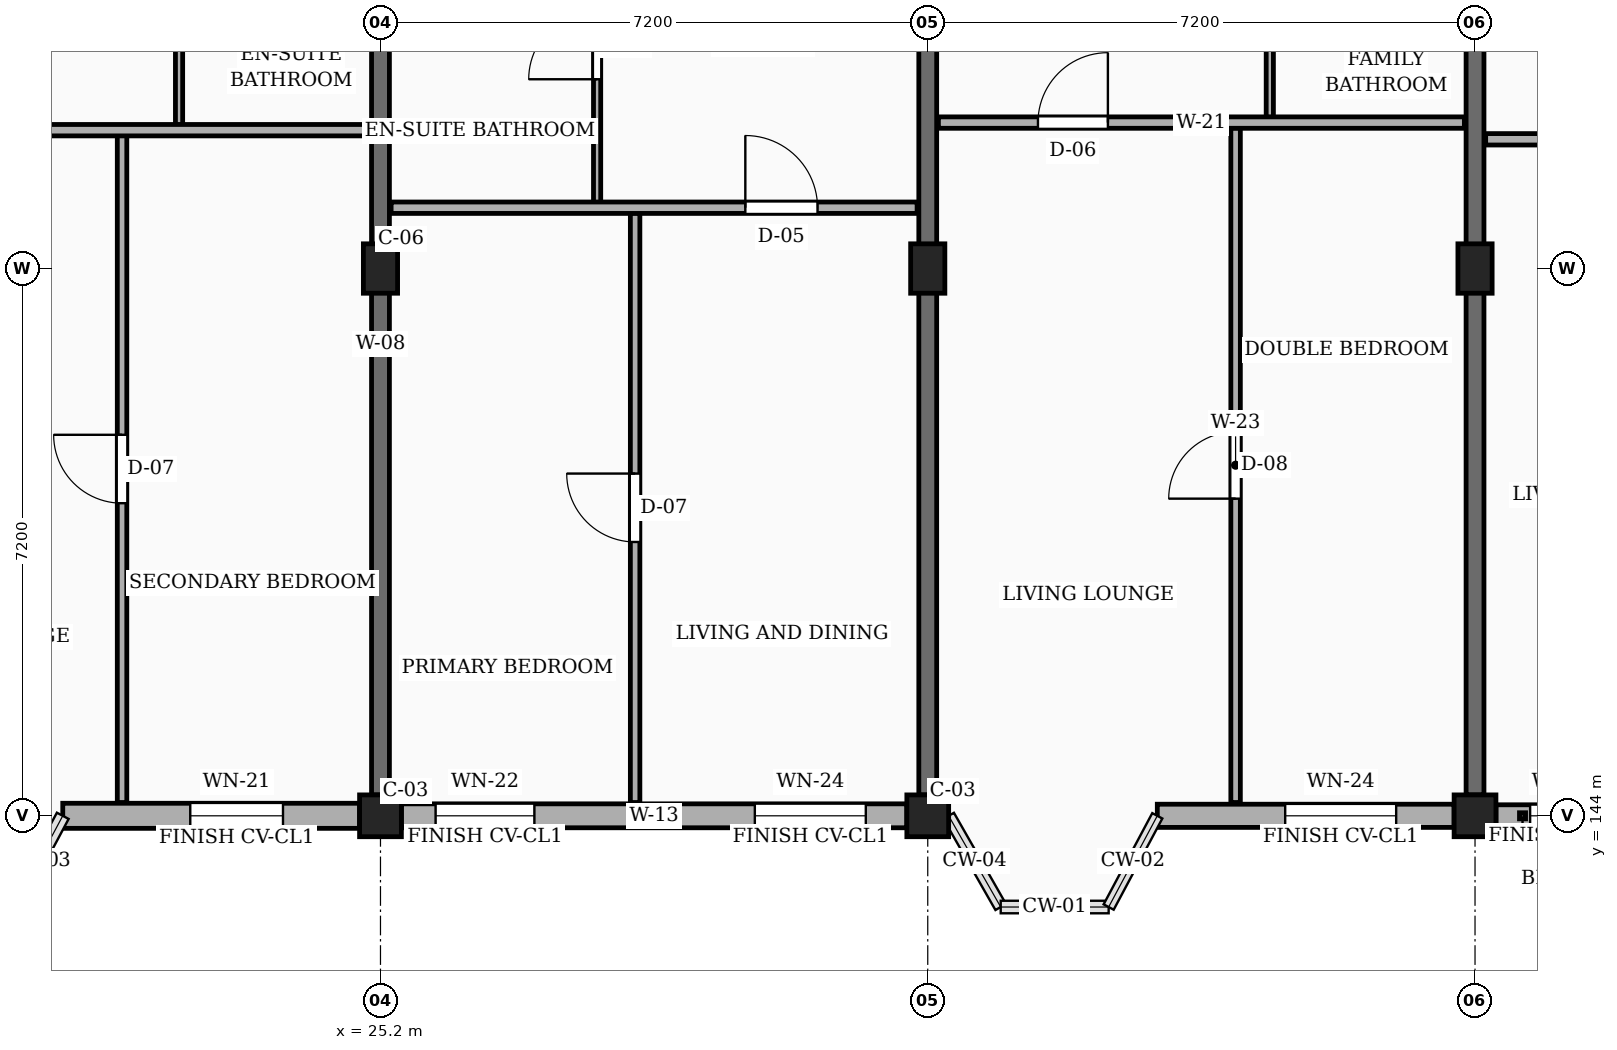
"""IFC4 building model, lengths in metres.
Left out: names, types, materials, properties, quantities, classifications, styles, units other than length and angle.
Written with IfcOpenShell. Run it as: python <this file> out.ifc"""

import sys

from ifc_helpers import new_model, si_unit, direction, frame, frame_2d, origin, origin_2d, place, context, subcontext, project, spatial, rectangle, extrude, element, fill, save


model = new_model("IFC4")
c1 = context("Model", 3, precision=1e-05, world=origin(), true_north=direction((0.0, 1.0)))
c2 = subcontext(c1, "Body", "Model", "MODEL_VIEW")
j1 = project(units=[si_unit("LENGTHUNIT", "METRE"), si_unit("PLANEANGLEUNIT", "RADIAN")], contexts=[c1])
p1 = place(None, origin())
s1 = spatial("IfcSite", under=j1, at=p1, CompositionType="ELEMENT")
p2 = place(p1, origin())
s2 = spatial("IfcBuilding", under=s1, at=p2, CompositionType="ELEMENT")
p3 = place(p2, frame((0.0, 0.0, 20.25)))
s3 = spatial("IfcBuildingStorey", under=s2, at=p3, CompositionType="ELEMENT", Elevation=20.25)
p4 = place(p3, frame((25.2, 144.0, 0.0), z_axis=(0.0, 0.0, 1.0), x_axis=(1.0, 0.0, 0.0)))
e1 = element("IfcColumn", 1, at=p4, inside=s3, PredefinedType="COLUMN", context=c2, shape_type="SweptSolid", body=[
    extrude(rectangle(XDim=0.55, YDim=0.55, at=origin_2d()), origin(), (0.0, 0.0, 1.0), 3.15),
])
p5 = place(p3, frame((25.2, 151.2, 0.0), z_axis=(0.0, 0.0, 1.0), x_axis=(1.0, 0.0, 0.0)))
e2 = element("IfcColumn", 2, at=p5, inside=s3, PredefinedType="COLUMN", context=c2, shape_type="SweptSolid", body=[
    extrude(rectangle(XDim=0.45, YDim=0.65, at=origin_2d()), origin(), (0.0, 0.0, 1.0), 3.15),
])
p6 = place(p3, frame((32.4, 144.0, 0.0), z_axis=(0.0, 0.0, 1.0), x_axis=(1.0, 0.0, 0.0)))
e3 = element("IfcColumn", 3, at=p6, inside=s3, PredefinedType="COLUMN", context=c2, shape_type="SweptSolid", body=[
    extrude(rectangle(XDim=0.55, YDim=0.55, at=origin_2d()), origin(), (0.0, 0.0, 1.0), 3.15),
])
p7 = place(p3, frame((32.4, 151.2, 0.0), z_axis=(0.0, 0.0, 1.0), x_axis=(1.0, 0.0, 0.0)))
e4 = element("IfcColumn", 4, at=p7, inside=s3, PredefinedType="COLUMN", context=c2, shape_type="SweptSolid", body=[
    extrude(rectangle(XDim=0.45, YDim=0.65, at=origin_2d()), origin(), (0.0, 0.0, 1.0), 3.15),
])
p8 = place(p3, frame((39.6, 144.0, 0.0), z_axis=(0.0, 0.0, 1.0), x_axis=(1.0, 0.0, 0.0)))
e5 = element("IfcColumn", 5, at=p8, inside=s3, PredefinedType="COLUMN", context=c2, shape_type="SweptSolid", body=[
    extrude(rectangle(XDim=0.55, YDim=0.55, at=origin_2d()), origin(), (0.0, 0.0, 1.0), 3.15),
])
p9 = place(p3, frame((39.6, 151.2, 0.0), z_axis=(0.0, 0.0, 1.0), x_axis=(1.0, 0.0, 0.0)))
e6 = element("IfcColumn", 6, at=p9, inside=s3, PredefinedType="COLUMN", context=c2, shape_type="SweptSolid", body=[
    extrude(rectangle(XDim=0.45, YDim=0.65, at=origin_2d()), origin(), (0.0, 0.0, 1.0), 3.15),
])
for number, where, z_axis, x_axis in (
    (7, (25.2, 144.275, 0.0), (0.0, 0.0, 1.0), (0.0, 1.0, 0.0)),
    (8, (32.4, 144.275, 0.0), (0.0, 0.0, 1.0), (0.0, 1.0, 0.0)),
    (9, (39.6, 144.275, 0.0), (0.0, 0.0, 1.0), (0.0, 1.0, 0.0)),
):
    element("IfcWall", number, at=place(p3, frame(where, z_axis=z_axis, x_axis=x_axis)), inside=s3, PredefinedType="SOLIDWALL", context=c2, shape_type="SweptSolid", body=[
        extrude(rectangle(XDim=11.875, YDim=0.235, at=frame_2d((5.938, 0.0))), origin(), (0.0, 0.0, 1.0), 2.185),
    ])
p10 = place(p3, frame((21.02, 144.0, 0.0), z_axis=(0.0, 0.0, 1.0), x_axis=(1.0, 0.0, 0.0)))
e10 = element("IfcWall", 10, at=p10, inside=s3, PredefinedType="SOLIDWALL", context=c2, shape_type="SweptSolid", body=[
    extrude(rectangle(XDim=3.905, YDim=0.33, at=frame_2d((1.953, 0.0))), origin(), (0.0, 0.0, 1.0), 2.455),
])
p11 = place(p10, frame((1.677, 0.0, 0.78)))
e11 = element("IfcOpeningElement", 11, at=p11, cuts=e10, PredefinedType="OPENING", context=c2, shape_type="SweptSolid", body=[
    extrude(rectangle(XDim=1.22, YDim=1.36, at=frame_2d((0.61, 0.68))), frame((0.0, 0.175, 0.0), z_axis=(0.0, -1.0, 0.0), x_axis=(1.0, 0.0, 0.0)), (0.0, 0.0, 1.0), 0.35),
])
p12 = place(p3, frame((25.475, 144.0, 0.0), z_axis=(0.0, 0.0, 1.0), x_axis=(1.0, 0.0, 0.0)))
e12 = element("IfcWall", 12, at=p12, inside=s3, PredefinedType="SOLIDWALL", context=c2, shape_type="SweptSolid", body=[
    extrude(rectangle(XDim=6.65, YDim=0.315, at=frame_2d((3.325, 0.0))), origin(), (0.0, 0.0, 1.0), 2.455),
])
p13 = place(p12, frame((0.45, 0.0, 0.78)))
e13 = element("IfcOpeningElement", 13, at=p13, cuts=e12, PredefinedType="OPENING", context=c2, shape_type="SweptSolid", body=[
    extrude(rectangle(XDim=1.3, YDim=1.36, at=frame_2d((0.65, 0.68))), frame((0.0, 0.167, 0.0), z_axis=(0.0, -1.0, 0.0), x_axis=(1.0, 0.0, 0.0)), (0.0, 0.0, 1.0), 0.335),
])
p14 = place(p12, frame((4.65, 0.0, 0.78)))
e14 = element("IfcOpeningElement", 14, at=p14, cuts=e12, PredefinedType="OPENING", context=c2, shape_type="SweptSolid", body=[
    extrude(rectangle(XDim=1.46, YDim=1.36, at=frame_2d((0.73, 0.68))), frame((0.0, 0.167, 0.0), z_axis=(0.0, -1.0, 0.0), x_axis=(1.0, 0.0, 0.0)), (0.0, 0.0, 1.0), 0.335),
])
p15 = place(p3, frame((35.42, 144.0, 0.0), z_axis=(0.0, 0.0, 1.0), x_axis=(1.0, 0.0, 0.0)))
e15 = element("IfcWall", 15, at=p15, inside=s3, PredefinedType="SOLIDWALL", context=c2, shape_type="SweptSolid", body=[
    extrude(rectangle(XDim=3.905, YDim=0.305, at=frame_2d((1.953, 0.0))), origin(), (0.0, 0.0, 1.0), 2.455),
])
p16 = place(p15, frame((1.683, 0.0, 0.78)))
e16 = element("IfcOpeningElement", 16, at=p16, cuts=e15, PredefinedType="OPENING", context=c2, shape_type="SweptSolid", body=[
    extrude(rectangle(XDim=1.46, YDim=1.36, at=frame_2d((0.73, 0.68))), frame((0.0, 0.163, 0.0), z_axis=(0.0, -1.0, 0.0), x_axis=(1.0, 0.0, 0.0)), (0.0, 0.0, 1.0), 0.325),
])
p17 = place(p3, frame((39.875, 144.0, 0.0), z_axis=(0.0, 0.0, 1.0), x_axis=(1.0, 0.0, 0.0)))
e17 = element("IfcWall", 17, at=p17, inside=s3, PredefinedType="SOLIDWALL", context=c2, shape_type="SweptSolid", body=[
    extrude(rectangle(XDim=6.65, YDim=0.29, at=frame_2d((3.325, 0.0))), origin(), (0.0, 0.0, 1.0), 2.455),
])
p18 = place(p17, frame((0.45, 0.0, 0.78)))
e18 = element("IfcOpeningElement", 18, at=p18, cuts=e17, PredefinedType="OPENING", context=c2, shape_type="SweptSolid", body=[
    extrude(rectangle(XDim=0.94, YDim=1.44, at=frame_2d((0.47, 0.72))), frame((0.0, 0.155, 0.0), z_axis=(0.0, -1.0, 0.0), x_axis=(1.0, 0.0, 0.0)), (0.0, 0.0, 1.0), 0.31),
])
p19 = place(p17, frame((4.65, 0.0, 0.78)))
e19 = element("IfcOpeningElement", 19, at=p19, cuts=e17, PredefinedType="OPENING", context=c2, shape_type="SweptSolid", body=[
    extrude(rectangle(XDim=1.15, YDim=1.44, at=frame_2d((0.575, 0.72))), frame((0.0, 0.155, 0.0), z_axis=(0.0, -1.0, 0.0), x_axis=(1.0, 0.0, 0.0)), (0.0, 0.0, 1.0), 0.31),
])
p20 = place(p3, frame((21.8, 144.175, 0.0), z_axis=(0.0, 0.0, 1.0), x_axis=(0.0, 1.0, 0.0)))
e20 = element("IfcWall", 20, at=p20, inside=s3, PredefinedType="PARTITIONING", context=c2, shape_type="SweptSolid", body=[
    extrude(rectangle(XDim=8.775, YDim=0.125, at=frame_2d((4.387, 0.0))), origin(), (0.0, 0.0, 1.0), 2.32),
])
p21 = place(p20, frame((3.938, 0.0, 0.0)))
e21 = element("IfcOpeningElement", 21, at=p21, cuts=e20, PredefinedType="OPENING", context=c2, shape_type="SweptSolid", body=[
    extrude(rectangle(XDim=0.9, YDim=2.1, at=frame_2d((0.45, 1.05))), frame((0.0, 0.073, 0.0), z_axis=(0.0, -1.0, 0.0), x_axis=(1.0, 0.0, 0.0)), (0.0, 0.0, 1.0), 0.145),
])
p22 = place(p3, frame((22.55, 153.09, 0.0), z_axis=(0.0, 0.0, 1.0), x_axis=(0.0, 1.0, 0.0)))
e22 = element("IfcWall", 22, at=p22, inside=s3, PredefinedType="PARTITIONING", context=c2, shape_type="SweptSolid", body=[
    extrude(rectangle(XDim=3.12, YDim=0.095, at=frame_2d((1.56, 0.0))), origin(), (0.0, 0.0, 1.0), 2.32),
])
p23 = place(p22, frame((1.11, 0.0, 0.0)))
e23 = element("IfcOpeningElement", 23, at=p23, cuts=e22, PredefinedType="OPENING", context=c2, shape_type="SweptSolid", body=[
    extrude(rectangle(XDim=0.9, YDim=2.05, at=frame_2d((0.45, 1.025))), frame((0.0, 0.058, 0.0), z_axis=(0.0, -1.0, 0.0), x_axis=(1.0, 0.0, 0.0)), (0.0, 0.0, 1.0), 0.115),
])
p24 = place(p3, frame((18.14, 153.02, 0.0), z_axis=(0.0, 0.0, 1.0), x_axis=(1.0, 0.0, 0.0)))
e24 = element("IfcWall", 24, at=p24, inside=s3, PredefinedType="PARTITIONING", context=c2, shape_type="SweptSolid", body=[
    extrude(rectangle(XDim=6.92, YDim=0.15, at=frame_2d((3.46, 0.0))), origin(), (0.0, 0.0, 1.0), 2.32),
])
p25 = place(p24, frame((1.31, 0.0, 0.0)))
e25 = element("IfcOpeningElement", 25, at=p25, cuts=e24, PredefinedType="OPENING", context=c2, shape_type="SweptSolid", body=[
    extrude(rectangle(XDim=0.95, YDim=2.1, at=frame_2d((0.475, 1.05))), frame((0.0, 0.085, 0.0), z_axis=(0.0, -1.0, 0.0), x_axis=(1.0, 0.0, 0.0)), (0.0, 0.0, 1.0), 0.17),
])
p26 = place(p3, frame((28.55, 144.175, 0.0), z_axis=(0.0, 0.0, 1.0), x_axis=(0.0, 1.0, 0.0)))
e26 = element("IfcWall", 26, at=p26, inside=s3, PredefinedType="PARTITIONING", context=c2, shape_type="SweptSolid", body=[
    extrude(rectangle(XDim=7.755, YDim=0.125, at=frame_2d((3.877, 0.0))), origin(), (0.0, 0.0, 1.0), 2.32),
])
p27 = place(p26, frame((3.427, 0.0, 0.0)))
e27 = element("IfcOpeningElement", 27, at=p27, cuts=e26, PredefinedType="OPENING", context=c2, shape_type="SweptSolid", body=[
    extrude(rectangle(XDim=0.9, YDim=2.1, at=frame_2d((0.45, 1.05))), frame((0.0, 0.073, 0.0), z_axis=(0.0, -1.0, 0.0), x_axis=(1.0, 0.0, 0.0)), (0.0, 0.0, 1.0), 0.145),
])
p28 = place(p3, frame((28.05, 152.07, 0.0), z_axis=(0.0, 0.0, 1.0), x_axis=(0.0, 1.0, 0.0)))
e28 = element("IfcWall", 28, at=p28, inside=s3, PredefinedType="PARTITIONING", context=c2, shape_type="SweptSolid", body=[
    extrude(rectangle(XDim=4.14, YDim=0.095, at=frame_2d((2.07, 0.0))), origin(), (0.0, 0.0, 1.0), 2.32),
])
p29 = place(p28, frame((1.62, 0.0, 0.0)))
e29 = element("IfcOpeningElement", 29, at=p29, cuts=e28, PredefinedType="OPENING", context=c2, shape_type="SweptSolid", body=[
    extrude(rectangle(XDim=0.9, YDim=2.05, at=frame_2d((0.45, 1.025))), frame((0.0, 0.058, 0.0), z_axis=(0.0, -1.0, 0.0), x_axis=(1.0, 0.0, 0.0)), (0.0, 0.0, 1.0), 0.115),
])
p30 = place(p3, frame((25.34, 152.0, 0.0), z_axis=(0.0, 0.0, 1.0), x_axis=(1.0, 0.0, 0.0)))
e30 = element("IfcWall", 30, at=p30, inside=s3, PredefinedType="PARTITIONING", context=c2, shape_type="SweptSolid", body=[
    extrude(rectangle(XDim=6.92, YDim=0.15, at=frame_2d((3.46, 0.0))), origin(), (0.0, 0.0, 1.0), 2.32),
])
p31 = place(p30, frame((4.66, 0.0, 0.0)))
e31 = element("IfcOpeningElement", 31, at=p31, cuts=e30, PredefinedType="OPENING", context=c2, shape_type="SweptSolid", body=[
    extrude(rectangle(XDim=0.95, YDim=2.1, at=frame_2d((0.475, 1.05))), frame((0.0, 0.085, 0.0), z_axis=(0.0, -1.0, 0.0), x_axis=(1.0, 0.0, 0.0)), (0.0, 0.0, 1.0), 0.17),
])
p32 = place(p3, frame((36.45, 144.175, 0.0), z_axis=(0.0, 0.0, 1.0), x_axis=(0.0, 1.0, 0.0)))
e32 = element("IfcWall", 32, at=p32, inside=s3, PredefinedType="PARTITIONING", context=c2, shape_type="SweptSolid", body=[
    extrude(rectangle(XDim=8.875, YDim=0.125, at=frame_2d((4.438, 0.0))), origin(), (0.0, 0.0, 1.0), 2.32),
])
p33 = place(p32, frame((3.998, 0.0, 0.0)))
e33 = element("IfcOpeningElement", 33, at=p33, cuts=e32, PredefinedType="OPENING", context=c2, shape_type="SweptSolid", body=[
    extrude(rectangle(XDim=0.88, YDim=2.08, at=frame_2d((0.44, 1.04))), frame((0.0, 0.073, 0.0), z_axis=(0.0, -1.0, 0.0), x_axis=(1.0, 0.0, 0.0)), (0.0, 0.0, 1.0), 0.145),
])
p34 = place(p3, frame((36.9, 153.19, 0.0), z_axis=(0.0, 0.0, 1.0), x_axis=(0.0, 1.0, 0.0)))
e34 = element("IfcWall", 34, at=p34, inside=s3, PredefinedType="PARTITIONING", context=c2, shape_type="SweptSolid", body=[
    extrude(rectangle(XDim=3.02, YDim=0.095, at=frame_2d((1.51, 0.0))), origin(), (0.0, 0.0, 1.0), 2.32),
])
p35 = place(p34, frame((1.075, 0.0, 0.0)))
e35 = element("IfcOpeningElement", 35, at=p35, cuts=e34, PredefinedType="OPENING", context=c2, shape_type="SweptSolid", body=[
    extrude(rectangle(XDim=0.87, YDim=2.05, at=frame_2d((0.435, 1.025))), frame((0.0, 0.058, 0.0), z_axis=(0.0, -1.0, 0.0), x_axis=(1.0, 0.0, 0.0)), (0.0, 0.0, 1.0), 0.115),
])
p36 = place(p3, frame((32.54, 153.12, 0.0), z_axis=(0.0, 0.0, 1.0), x_axis=(1.0, 0.0, 0.0)))
e36 = element("IfcWall", 36, at=p36, inside=s3, PredefinedType="PARTITIONING", context=c2, shape_type="SweptSolid", body=[
    extrude(rectangle(XDim=6.92, YDim=0.15, at=frame_2d((3.46, 0.0))), origin(), (0.0, 0.0, 1.0), 2.32),
])
p37 = place(p36, frame((1.31, 0.0, 0.0)))
e37 = element("IfcOpeningElement", 37, at=p37, cuts=e36, PredefinedType="OPENING", context=c2, shape_type="SweptSolid", body=[
    extrude(rectangle(XDim=0.92, YDim=2.1, at=frame_2d((0.46, 1.05))), frame((0.0, 0.085, 0.0), z_axis=(0.0, -1.0, 0.0), x_axis=(1.0, 0.0, 0.0)), (0.0, 0.0, 1.0), 0.17),
])
p38 = place(p3, frame((39.74, 152.9, 0.0), z_axis=(0.0, 0.0, 1.0), x_axis=(1.0, 0.0, 0.0)))
e38 = element("IfcWall", 38, at=p38, inside=s3, PredefinedType="PARTITIONING", context=c2, shape_type="SweptSolid", body=[
    extrude(rectangle(XDim=6.92, YDim=0.15, at=frame_2d((3.46, 0.0))), origin(), (0.0, 0.0, 1.0), 2.32),
])
p39 = place(p38, frame((1.31, 0.0, 0.0)))
e39 = element("IfcOpeningElement", 39, at=p39, cuts=e38, PredefinedType="OPENING", context=c2, shape_type="SweptSolid", body=[
    extrude(rectangle(XDim=0.95, YDim=2.1, at=frame_2d((0.475, 1.05))), frame((0.0, 0.085, 0.0), z_axis=(0.0, -1.0, 0.0), x_axis=(1.0, 0.0, 0.0)), (0.0, 0.0, 1.0), 0.17),
])
p40 = place(p11, origin())
e40 = element("IfcWindow", 40, at=p40, inside=s3, PartitioningType="SINGLE_PANEL", PredefinedType="WINDOW", context=c2, shape_type="SweptSolid", body=[
    extrude(rectangle(XDim=1.22, YDim=1.36, at=frame_2d((0.61, 0.68))), frame((0.0, 0.03, 0.0), z_axis=(0.0, -1.0, 0.0), x_axis=(1.0, 0.0, 0.0)), (0.0, 0.0, 1.0), 0.06),
])
fill(e11, e40)
p41 = place(p13, origin())
e41 = element("IfcWindow", 41, at=p41, inside=s3, PartitioningType="SINGLE_PANEL", PredefinedType="WINDOW", context=c2, shape_type="SweptSolid", body=[
    extrude(rectangle(XDim=1.3, YDim=1.36, at=frame_2d((0.65, 0.68))), frame((0.0, 0.03, 0.0), z_axis=(0.0, -1.0, 0.0), x_axis=(1.0, 0.0, 0.0)), (0.0, 0.0, 1.0), 0.06),
])
fill(e13, e41)
p42 = place(p14, origin())
e42 = element("IfcWindow", 42, at=p42, inside=s3, PartitioningType="SINGLE_PANEL", PredefinedType="WINDOW", context=c2, shape_type="SweptSolid", body=[
    extrude(rectangle(XDim=1.46, YDim=1.36, at=frame_2d((0.73, 0.68))), frame((0.0, 0.03, 0.0), z_axis=(0.0, -1.0, 0.0), x_axis=(1.0, 0.0, 0.0)), (0.0, 0.0, 1.0), 0.06),
])
fill(e14, e42)
p43 = place(p16, origin())
e43 = element("IfcWindow", 43, at=p43, inside=s3, PartitioningType="SINGLE_PANEL", PredefinedType="WINDOW", context=c2, shape_type="SweptSolid", body=[
    extrude(rectangle(XDim=1.46, YDim=1.36, at=frame_2d((0.73, 0.68))), frame((0.0, 0.03, 0.0), z_axis=(0.0, -1.0, 0.0), x_axis=(1.0, 0.0, 0.0)), (0.0, 0.0, 1.0), 0.06),
])
fill(e16, e43)
p44 = place(p18, origin())
e44 = element("IfcWindow", 44, at=p44, inside=s3, PartitioningType="SINGLE_PANEL", PredefinedType="WINDOW", context=c2, shape_type="SweptSolid", body=[
    extrude(rectangle(XDim=0.94, YDim=1.44, at=frame_2d((0.47, 0.72))), frame((0.0, 0.03, 0.0), z_axis=(0.0, -1.0, 0.0), x_axis=(1.0, 0.0, 0.0)), (0.0, 0.0, 1.0), 0.06),
])
fill(e18, e44)
p45 = place(p21, origin())
e45 = element("IfcDoor", 45, at=p45, inside=s3, OperationType="SINGLE_SWING_RIGHT", PredefinedType="DOOR", context=c2, shape_type="SweptSolid", body=[
    extrude(rectangle(XDim=0.9, YDim=2.1, at=frame_2d((0.45, 1.05))), frame((0.0, 0.025, 0.0), z_axis=(0.0, -1.0, 0.0), x_axis=(1.0, 0.0, 0.0)), (0.0, 0.0, 1.0), 0.05),
])
fill(e21, e45)
p46 = place(p27, origin())
e46 = element("IfcDoor", 46, at=p46, inside=s3, OperationType="SINGLE_SWING_RIGHT", PredefinedType="DOOR", context=c2, shape_type="SweptSolid", body=[
    extrude(rectangle(XDim=0.9, YDim=2.1, at=frame_2d((0.45, 1.05))), frame((0.0, 0.025, 0.0), z_axis=(0.0, -1.0, 0.0), x_axis=(1.0, 0.0, 0.0)), (0.0, 0.0, 1.0), 0.05),
])
fill(e27, e46)
p47 = place(p29, origin())
e47 = element("IfcDoor", 47, at=p47, inside=s3, OperationType="SINGLE_SWING_LEFT", PredefinedType="DOOR", context=c2, shape_type="SweptSolid", body=[
    extrude(rectangle(XDim=0.9, YDim=2.05, at=frame_2d((0.45, 1.025))), frame((0.0, 0.025, 0.0), z_axis=(0.0, -1.0, 0.0), x_axis=(1.0, 0.0, 0.0)), (0.0, 0.0, 1.0), 0.05),
])
fill(e29, e47)
p48 = place(p31, origin())
e48 = element("IfcDoor", 48, at=p48, inside=s3, OperationType="SINGLE_SWING_LEFT", PredefinedType="DOOR", context=c2, shape_type="SweptSolid", body=[
    extrude(rectangle(XDim=0.95, YDim=2.1, at=frame_2d((0.475, 1.05))), frame((0.0, 0.025, 0.0), z_axis=(0.0, -1.0, 0.0), x_axis=(1.0, 0.0, 0.0)), (0.0, 0.0, 1.0), 0.05),
])
fill(e31, e48)
p49 = place(p33, origin())
e49 = element("IfcDoor", 49, at=p49, inside=s3, OperationType="SINGLE_SWING_LEFT", PredefinedType="DOOR", context=c2, shape_type="SweptSolid", body=[
    extrude(rectangle(XDim=0.88, YDim=2.08, at=frame_2d((0.44, 1.04))), frame((0.0, 0.025, 0.0), z_axis=(0.0, -1.0, 0.0), x_axis=(1.0, 0.0, 0.0)), (0.0, 0.0, 1.0), 0.05),
])
fill(e33, e49)
p50 = place(p37, origin())
e50 = element("IfcDoor", 50, at=p50, inside=s3, OperationType="SINGLE_SWING_RIGHT", PredefinedType="DOOR", context=c2, shape_type="SweptSolid", body=[
    extrude(rectangle(XDim=0.92, YDim=2.1, at=frame_2d((0.46, 1.05))), frame((0.0, 0.025, 0.0), z_axis=(0.0, -1.0, 0.0), x_axis=(1.0, 0.0, 0.0)), (0.0, 0.0, 1.0), 0.05),
])
fill(e37, e50)
save(model, sys.argv[1])
